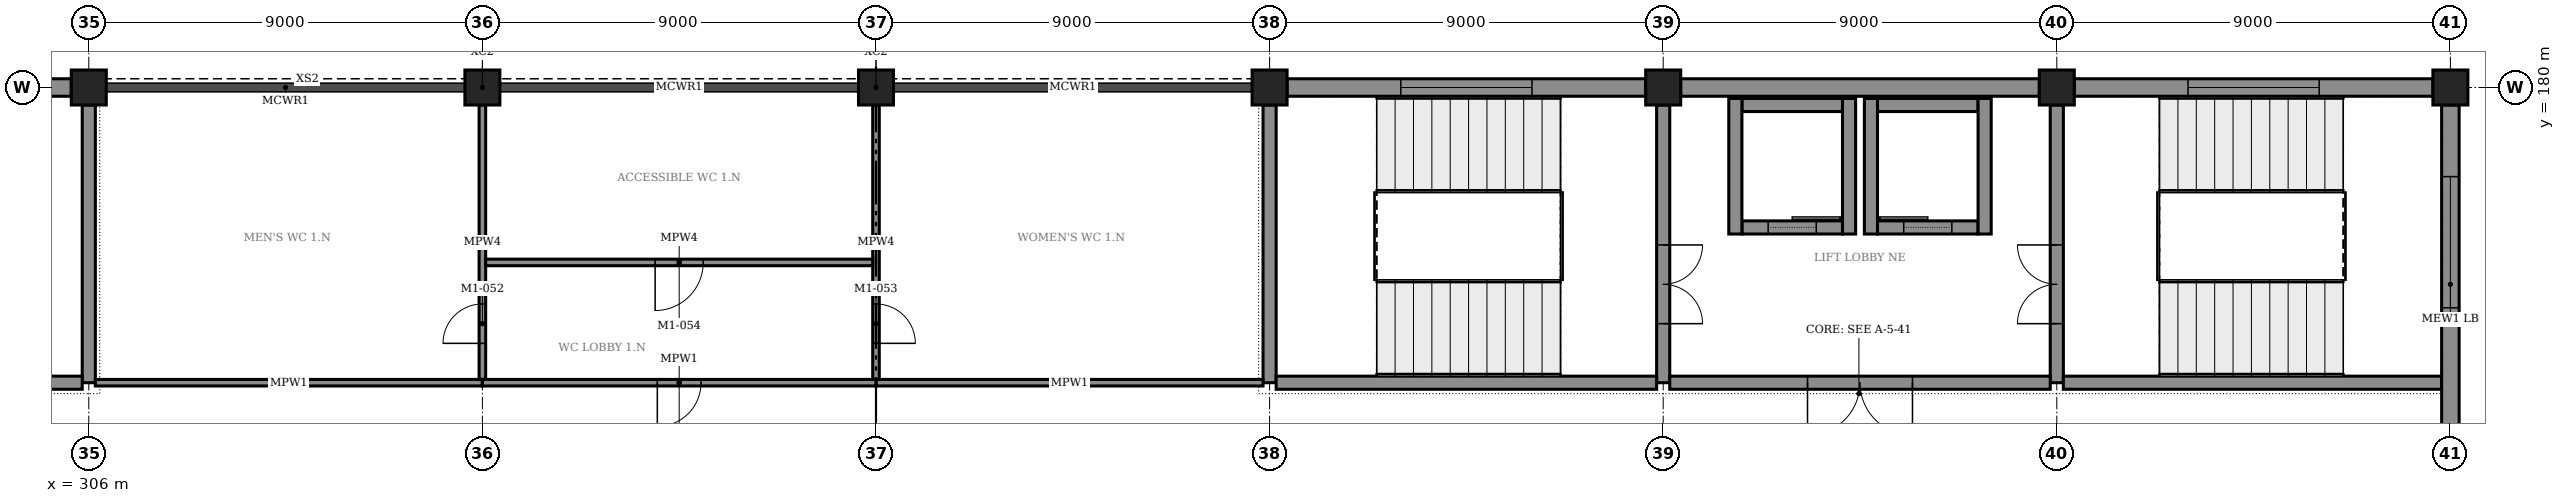
"""IFC4 building model, lengths in metres.
Left out: names, types, materials, properties, quantities, classifications, styles, units other than length and angle.
Written with IfcOpenShell. Run it as: python <this file> out.ifc"""

import sys

from ifc_helpers import new_model, si_unit, direction, frame, frame_2d, origin, origin_2d, place, context, subcontext, project, spatial, rectangle, extrude, element, fill, save


model = new_model("IFC4")
c1 = context("Model", 3, precision=1e-05, world=origin(), true_north=direction((0.0, 1.0)))
c2 = subcontext(c1, "Body", "Model", "MODEL_VIEW")
j1 = project(units=[si_unit("LENGTHUNIT", "METRE"), si_unit("PLANEANGLEUNIT", "RADIAN")], contexts=[c1])
p1 = place(None, origin())
s1 = spatial("IfcSite", under=j1, at=p1, CompositionType="ELEMENT")
p2 = place(p1, origin())
s2 = spatial("IfcBuilding", under=s1, at=p2, CompositionType="ELEMENT")
p3 = place(p2, frame((0.0, 0.0, 6.0)))
s3 = spatial("IfcBuildingStorey", under=s2, at=p3, CompositionType="ELEMENT", Elevation=6.0)
for number, where, z_axis, x_axis in (
    (1, (306.0, 180.0, 0.0), (0.0, 0.0, 1.0), (1.0, 0.0, 0.0)),
    (2, (315.0, 180.0, 0.0), (0.0, 0.0, 1.0), (1.0, 0.0, 0.0)),
    (3, (324.0, 180.0, 0.0), (0.0, 0.0, 1.0), (1.0, 0.0, 0.0)),
    (4, (333.0, 180.0, 0.0), (0.0, 0.0, 1.0), (1.0, 0.0, 0.0)),
    (5, (342.0, 180.0, 0.0), (0.0, 0.0, 1.0), (1.0, 0.0, 0.0)),
    (6, (351.0, 180.0, 0.0), (0.0, 0.0, 1.0), (1.0, 0.0, 0.0)),
    (7, (360.0, 180.0, 0.0), (0.0, 0.0, 1.0), (1.0, 0.0, 0.0)),
):
    element("IfcColumn", number, at=place(p3, frame(where, z_axis=z_axis, x_axis=x_axis)), inside=s3, PredefinedType="COLUMN", context=c2, shape_type="SweptSolid", body=[
        extrude(rectangle(XDim=0.8, YDim=0.8, at=origin_2d()), origin(), (0.0, 0.0, 1.0), 5.5),
    ])
p4 = place(p3, frame((297.4, 180.0, 0.0), z_axis=(0.0, 0.0, 1.0), x_axis=(1.0, 0.0, 0.0)))
e8 = element("IfcWall", 8, at=p4, inside=s3, PredefinedType="STANDARD", context=c2, shape_type="SweptSolid", body=[
    extrude(rectangle(XDim=8.2, YDim=0.4, at=frame_2d((4.1, 0.0))), origin(), (0.0, 0.0, 1.0), 4.32),
])
p5 = place(p4, frame((2.6, 0.0, 0.9)))
e9 = element("IfcOpeningElement", 9, at=p5, cuts=e8, PredefinedType="OPENING", context=c2, shape_type="SweptSolid", body=[
    extrude(rectangle(XDim=3.0, YDim=2.1, at=frame_2d((1.5, 1.05))), frame((0.0, 0.21, 0.0), z_axis=(0.0, -1.0, 0.0), x_axis=(1.0, 0.0, 0.0)), (0.0, 0.0, 1.0), 0.42),
])
p6 = place(p3, frame((333.4, 180.0, 0.0), z_axis=(0.0, 0.0, 1.0), x_axis=(1.0, 0.0, 0.0)))
e10 = element("IfcWall", 10, at=p6, inside=s3, PredefinedType="STANDARD", context=c2, shape_type="SweptSolid", body=[
    extrude(rectangle(XDim=8.2, YDim=0.4, at=frame_2d((4.1, 0.0))), origin(), (0.0, 0.0, 1.0), 4.32),
])
p7 = place(p6, frame((2.6, 0.0, 0.9)))
e11 = element("IfcOpeningElement", 11, at=p7, cuts=e10, PredefinedType="OPENING", context=c2, shape_type="SweptSolid", body=[
    extrude(rectangle(XDim=3.0, YDim=2.1, at=frame_2d((1.5, 1.05))), frame((0.0, 0.21, 0.0), z_axis=(0.0, -1.0, 0.0), x_axis=(1.0, 0.0, 0.0)), (0.0, 0.0, 1.0), 0.42),
])
p8 = place(p3, frame((342.4, 180.0, 0.0), z_axis=(0.0, 0.0, 1.0), x_axis=(1.0, 0.0, 0.0)))
e12 = element("IfcWall", 12, at=p8, inside=s3, PredefinedType="STANDARD", context=c2, shape_type="SweptSolid", body=[
    extrude(rectangle(XDim=8.2, YDim=0.4, at=frame_2d((4.1, 0.0))), origin(), (0.0, 0.0, 1.0), 4.32),
])
p9 = place(p3, frame((351.4, 180.0, 0.0), z_axis=(0.0, 0.0, 1.0), x_axis=(1.0, 0.0, 0.0)))
e13 = element("IfcWall", 13, at=p9, inside=s3, PredefinedType="STANDARD", context=c2, shape_type="SweptSolid", body=[
    extrude(rectangle(XDim=8.2, YDim=0.4, at=frame_2d((4.1, 0.0))), origin(), (0.0, 0.0, 1.0), 4.32),
])
p10 = place(p9, frame((2.6, 0.0, 0.9)))
e14 = element("IfcOpeningElement", 14, at=p10, cuts=e13, PredefinedType="OPENING", context=c2, shape_type="SweptSolid", body=[
    extrude(rectangle(XDim=3.0, YDim=2.1, at=frame_2d((1.5, 1.05))), frame((0.0, 0.21, 0.0), z_axis=(0.0, -1.0, 0.0), x_axis=(1.0, 0.0, 0.0)), (0.0, 0.0, 1.0), 0.42),
])
p11 = place(p3, frame((360.0, 171.4, 0.0), z_axis=(0.0, 0.0, 1.0), x_axis=(0.0, 1.0, 0.0)))
e15 = element("IfcWall", 15, at=p11, inside=s3, PredefinedType="STANDARD", context=c2, shape_type="SweptSolid", body=[
    extrude(rectangle(XDim=8.2, YDim=0.4, at=frame_2d((4.1, 0.0))), origin(), (0.0, 0.0, 1.0), 4.32),
])
p12 = place(p11, frame((3.562, 0.0, 0.9)))
e16 = element("IfcOpeningElement", 16, at=p12, cuts=e15, PredefinedType="OPENING", context=c2, shape_type="SweptSolid", body=[
    extrude(rectangle(XDim=3.0, YDim=2.1, at=frame_2d((1.5, 1.05))), frame((0.0, 0.21, 0.0), z_axis=(0.0, -1.0, 0.0), x_axis=(1.0, 0.0, 0.0)), (0.0, 0.0, 1.0), 0.42),
])
p13 = place(p3, frame((306.0, 173.25, 0.0), z_axis=(0.0, 0.0, 1.0), x_axis=(0.0, 1.0, 0.0)))
e17 = element("IfcWall", 17, at=p13, inside=s3, PredefinedType="SHEAR", context=c2, shape_type="SweptSolid", body=[
    extrude(rectangle(XDim=6.35, YDim=0.3, at=frame_2d((3.175, 0.0))), origin(), (0.0, 0.0, 1.0), 5.22),
])
p14 = place(p3, frame((297.15, 173.25, 0.0), z_axis=(0.0, 0.0, 1.0), x_axis=(1.0, 0.0, 0.0)))
e18 = element("IfcWall", 18, at=p14, inside=s3, PredefinedType="SHEAR", context=c2, shape_type="SweptSolid", body=[
    extrude(rectangle(XDim=8.7, YDim=0.3, at=frame_2d((4.35, 0.0))), origin(), (0.0, 0.0, 1.0), 5.22),
])
p15 = place(p3, frame((351.0, 173.25, 0.0), z_axis=(0.0, 0.0, 1.0), x_axis=(0.0, 1.0, 0.0)))
e19 = element("IfcWall", 19, at=p15, inside=s3, PredefinedType="SHEAR", context=c2, shape_type="SweptSolid", body=[
    extrude(rectangle(XDim=6.35, YDim=0.3, at=frame_2d((3.175, 0.0))), origin(), (0.0, 0.0, 1.0), 5.22),
])
p16 = place(p15, frame((1.35, 0.0, 0.0)))
e20 = element("IfcOpeningElement", 20, at=p16, cuts=e19, PredefinedType="OPENING", context=c2, shape_type="SweptSolid", body=[
    extrude(rectangle(XDim=1.8, YDim=2.4, at=frame_2d((0.9, 1.2))), frame((0.0, 0.16, 0.0), z_axis=(0.0, -1.0, 0.0), x_axis=(1.0, 0.0, 0.0)), (0.0, 0.0, 1.0), 0.32),
])
p17 = place(p3, frame((342.0, 173.25, 0.0), z_axis=(0.0, 0.0, 1.0), x_axis=(0.0, 1.0, 0.0)))
e21 = element("IfcWall", 21, at=p17, inside=s3, PredefinedType="SHEAR", context=c2, shape_type="SweptSolid", body=[
    extrude(rectangle(XDim=6.35, YDim=0.3, at=frame_2d((3.175, 0.0))), origin(), (0.0, 0.0, 1.0), 5.22),
])
p18 = place(p17, frame((1.35, 0.0, 0.0)))
e22 = element("IfcOpeningElement", 22, at=p18, cuts=e21, PredefinedType="OPENING", context=c2, shape_type="SweptSolid", body=[
    extrude(rectangle(XDim=1.8, YDim=2.4, at=frame_2d((0.9, 1.2))), frame((0.0, 0.16, 0.0), z_axis=(0.0, -1.0, 0.0), x_axis=(1.0, 0.0, 0.0)), (0.0, 0.0, 1.0), 0.32),
])
p19 = place(p3, frame((333.0, 173.25, 0.0), z_axis=(0.0, 0.0, 1.0), x_axis=(0.0, 1.0, 0.0)))
e23 = element("IfcWall", 23, at=p19, inside=s3, PredefinedType="SHEAR", context=c2, shape_type="SweptSolid", body=[
    extrude(rectangle(XDim=6.35, YDim=0.3, at=frame_2d((3.175, 0.0))), origin(), (0.0, 0.0, 1.0), 5.22),
])
p20 = place(p3, frame((333.15, 173.25, 0.0), z_axis=(0.0, 0.0, 1.0), x_axis=(1.0, 0.0, 0.0)))
e24 = element("IfcWall", 24, at=p20, inside=s3, PredefinedType="SHEAR", context=c2, shape_type="SweptSolid", body=[
    extrude(rectangle(XDim=8.7, YDim=0.3, at=frame_2d((4.35, 0.0))), origin(), (0.0, 0.0, 1.0), 5.22),
])
p21 = place(p3, frame((342.15, 173.25, 0.0), z_axis=(0.0, 0.0, 1.0), x_axis=(1.0, 0.0, 0.0)))
e25 = element("IfcWall", 25, at=p21, inside=s3, PredefinedType="SHEAR", context=c2, shape_type="SweptSolid", body=[
    extrude(rectangle(XDim=8.7, YDim=0.3, at=frame_2d((4.35, 0.0))), origin(), (0.0, 0.0, 1.0), 5.22),
])
p22 = place(p21, frame((3.15, 0.0, 0.0)))
e26 = element("IfcOpeningElement", 26, at=p22, cuts=e25, PredefinedType="OPENING", context=c2, shape_type="SweptSolid", body=[
    extrude(rectangle(XDim=2.4, YDim=2.4, at=frame_2d((1.2, 1.2))), frame((0.0, 0.16, 0.0), z_axis=(0.0, -1.0, 0.0), x_axis=(1.0, 0.0, 0.0)), (0.0, 0.0, 1.0), 0.32),
])
p23 = place(p3, frame((351.15, 173.25, 0.0), z_axis=(0.0, 0.0, 1.0), x_axis=(1.0, 0.0, 0.0)))
e27 = element("IfcWall", 27, at=p23, inside=s3, PredefinedType="SHEAR", context=c2, shape_type="SweptSolid", body=[
    extrude(rectangle(XDim=8.65, YDim=0.3, at=frame_2d((4.325, 0.0))), origin(), (0.0, 0.0, 1.0), 5.22),
])
for number, where, z_axis, x_axis in (
    (28, (349.35, 176.65, 0.0), (0.0, 0.0, 1.0), (0.0, 1.0, 0.0)),
    (29, (346.75, 176.65, 0.0), (0.0, 0.0, 1.0), (0.0, 1.0, 0.0)),
):
    element("IfcWall", number, at=place(p3, frame(where, z_axis=z_axis, x_axis=x_axis)), inside=s3, PredefinedType="SHEAR", context=c2, shape_type="SweptSolid", body=[
        extrude(rectangle(XDim=3.1, YDim=0.3, at=frame_2d((1.55, 0.0))), origin(), (0.0, 0.0, 1.0), 5.5),
    ])
p24 = place(p3, frame((346.9, 179.6, 0.0), z_axis=(0.0, 0.0, 1.0), x_axis=(1.0, 0.0, 0.0)))
e30 = element("IfcWall", 30, at=p24, inside=s3, PredefinedType="SHEAR", context=c2, shape_type="SweptSolid", body=[
    extrude(rectangle(XDim=2.3, YDim=0.3, at=frame_2d((1.15, 0.0))), origin(), (0.0, 0.0, 1.0), 5.5),
])
p25 = place(p3, frame((346.9, 176.8, 0.0), z_axis=(0.0, 0.0, 1.0), x_axis=(1.0, 0.0, 0.0)))
e31 = element("IfcWall", 31, at=p25, inside=s3, PredefinedType="SHEAR", context=c2, shape_type="SweptSolid", body=[
    extrude(rectangle(XDim=2.3, YDim=0.3, at=frame_2d((1.15, 0.0))), origin(), (0.0, 0.0, 1.0), 5.5),
])
p26 = place(p25, frame((0.6, 0.0, 0.0)))
e32 = element("IfcOpeningElement", 32, at=p26, cuts=e31, PredefinedType="OPENING", context=c2, shape_type="SweptSolid", body=[
    extrude(rectangle(XDim=1.1, YDim=2.2, at=frame_2d((0.55, 1.1))), frame((0.0, 0.16, 0.0), z_axis=(0.0, -1.0, 0.0), x_axis=(1.0, 0.0, 0.0)), (0.0, 0.0, 1.0), 0.32),
])
for number, where, z_axis, x_axis in (
    (33, (346.25, 176.65, 0.0), (0.0, 0.0, 1.0), (0.0, 1.0, 0.0)),
    (34, (343.65, 176.65, 0.0), (0.0, 0.0, 1.0), (0.0, 1.0, 0.0)),
):
    element("IfcWall", number, at=place(p3, frame(where, z_axis=z_axis, x_axis=x_axis)), inside=s3, PredefinedType="SHEAR", context=c2, shape_type="SweptSolid", body=[
        extrude(rectangle(XDim=3.1, YDim=0.3, at=frame_2d((1.55, 0.0))), origin(), (0.0, 0.0, 1.0), 5.5),
    ])
p27 = place(p3, frame((343.8, 179.6, 0.0), z_axis=(0.0, 0.0, 1.0), x_axis=(1.0, 0.0, 0.0)))
e35 = element("IfcWall", 35, at=p27, inside=s3, PredefinedType="SHEAR", context=c2, shape_type="SweptSolid", body=[
    extrude(rectangle(XDim=2.3, YDim=0.3, at=frame_2d((1.15, 0.0))), origin(), (0.0, 0.0, 1.0), 5.5),
])
p28 = place(p3, frame((343.8, 176.8, 0.0), z_axis=(0.0, 0.0, 1.0), x_axis=(1.0, 0.0, 0.0)))
e36 = element("IfcWall", 36, at=p28, inside=s3, PredefinedType="SHEAR", context=c2, shape_type="SweptSolid", body=[
    extrude(rectangle(XDim=2.3, YDim=0.3, at=frame_2d((1.15, 0.0))), origin(), (0.0, 0.0, 1.0), 5.5),
])
p29 = place(p28, frame((0.6, 0.0, 0.0)))
e37 = element("IfcOpeningElement", 37, at=p29, cuts=e36, PredefinedType="OPENING", context=c2, shape_type="SweptSolid", body=[
    extrude(rectangle(XDim=1.1, YDim=2.2, at=frame_2d((0.55, 1.1))), frame((0.0, 0.16, 0.0), z_axis=(0.0, -1.0, 0.0), x_axis=(1.0, 0.0, 0.0)), (0.0, 0.0, 1.0), 0.32),
])
p30 = place(p3, frame((306.15, 173.25, 0.0), z_axis=(0.0, 0.0, 1.0), x_axis=(1.0, 0.0, 0.0)))
e38 = element("IfcWall", 38, at=p30, inside=s3, PredefinedType="PARTITIONING", context=c2, shape_type="SweptSolid", body=[
    extrude(rectangle(XDim=8.85, YDim=0.15, at=frame_2d((4.425, 0.0))), origin(), (0.0, 0.0, 1.0), 4.32),
])
p31 = place(p3, frame((315.0, 173.325, 0.0), z_axis=(0.0, 0.0, 1.0), x_axis=(0.0, 1.0, 0.0)))
e39 = element("IfcWall", 39, at=p31, inside=s3, PredefinedType="PARTITIONING", context=c2, shape_type="SweptSolid", body=[
    extrude(rectangle(XDim=6.275, YDim=0.15, at=frame_2d((3.138, 0.0))), origin(), (0.0, 0.0, 1.0), 4.32),
])
p32 = place(p31, frame((0.825, 0.0, 0.0)))
e40 = element("IfcOpeningElement", 40, at=p32, cuts=e39, PredefinedType="OPENING", context=c2, shape_type="SweptSolid", body=[
    extrude(rectangle(XDim=0.9, YDim=2.1, at=frame_2d((0.45, 1.05))), frame((0.0, 0.085, 0.0), z_axis=(0.0, -1.0, 0.0), x_axis=(1.0, 0.0, 0.0)), (0.0, 0.0, 1.0), 0.17),
])
p33 = place(p3, frame((324.0, 173.25, 0.0), z_axis=(0.0, 0.0, 1.0), x_axis=(1.0, 0.0, 0.0)))
e41 = element("IfcWall", 41, at=p33, inside=s3, PredefinedType="PARTITIONING", context=c2, shape_type="SweptSolid", body=[
    extrude(rectangle(XDim=8.85, YDim=0.15, at=frame_2d((4.425, 0.0))), origin(), (0.0, 0.0, 1.0), 4.32),
])
p34 = place(p3, frame((324.0, 173.325, 0.0), z_axis=(0.0, 0.0, 1.0), x_axis=(0.0, 1.0, 0.0)))
e42 = element("IfcWall", 42, at=p34, inside=s3, PredefinedType="PARTITIONING", context=c2, shape_type="SweptSolid", body=[
    extrude(rectangle(XDim=6.275, YDim=0.15, at=frame_2d((3.138, 0.0))), origin(), (0.0, 0.0, 1.0), 4.32),
])
p35 = place(p34, frame((0.825, 0.0, 0.0)))
e43 = element("IfcOpeningElement", 43, at=p35, cuts=e42, PredefinedType="OPENING", context=c2, shape_type="SweptSolid", body=[
    extrude(rectangle(XDim=0.9, YDim=2.1, at=frame_2d((0.45, 1.05))), frame((0.0, 0.085, 0.0), z_axis=(0.0, -1.0, 0.0), x_axis=(1.0, 0.0, 0.0)), (0.0, 0.0, 1.0), 0.17),
])
p36 = place(p3, frame((315.075, 176.0, 0.0), z_axis=(0.0, 0.0, 1.0), x_axis=(1.0, 0.0, 0.0)))
e44 = element("IfcWall", 44, at=p36, inside=s3, PredefinedType="PARTITIONING", context=c2, shape_type="SweptSolid", body=[
    extrude(rectangle(XDim=8.85, YDim=0.15, at=frame_2d((4.425, 0.0))), origin(), (0.0, 0.0, 1.0), 4.32),
])
p37 = place(p36, frame((3.875, 0.0, 0.0)))
e45 = element("IfcOpeningElement", 45, at=p37, cuts=e44, PredefinedType="OPENING", context=c2, shape_type="SweptSolid", body=[
    extrude(rectangle(XDim=1.1, YDim=2.1, at=frame_2d((0.55, 1.05))), frame((0.0, 0.085, 0.0), z_axis=(0.0, -1.0, 0.0), x_axis=(1.0, 0.0, 0.0)), (0.0, 0.0, 1.0), 0.17),
])
p38 = place(p3, frame((315.0, 173.25, 0.0), z_axis=(0.0, 0.0, 1.0), x_axis=(1.0, 0.0, 0.0)))
e46 = element("IfcWall", 46, at=p38, inside=s3, PredefinedType="PARTITIONING", context=c2, shape_type="SweptSolid", body=[
    extrude(rectangle(XDim=9.0, YDim=0.15, at=frame_2d((4.5, 0.0))), origin(), (0.0, 0.0, 1.0), 4.32),
])
p39 = place(p38, frame((4.0, 0.0, 0.0)))
e47 = element("IfcOpeningElement", 47, at=p39, cuts=e46, PredefinedType="OPENING", context=c2, shape_type="SweptSolid", body=[
    extrude(rectangle(XDim=1.0, YDim=2.4, at=frame_2d((0.5, 1.2))), frame((0.0, 0.085, 0.0), z_axis=(0.0, -1.0, 0.0), x_axis=(1.0, 0.0, 0.0)), (0.0, 0.0, 1.0), 0.17),
])
p40 = place(p7, origin())
e48 = element("IfcWindow", 48, at=p40, inside=s3, PartitioningType="TRIPLE_PANEL_VERTICAL", PredefinedType="WINDOW", context=c2, shape_type="SweptSolid", body=[
    extrude(rectangle(XDim=3.0, YDim=2.1, at=frame_2d((1.5, 1.05))), frame((0.0, 0.03, 0.0), z_axis=(0.0, -1.0, 0.0), x_axis=(1.0, 0.0, 0.0)), (0.0, 0.0, 1.0), 0.06),
])
fill(e11, e48)
p41 = place(p10, origin())
e49 = element("IfcWindow", 49, at=p41, inside=s3, PartitioningType="TRIPLE_PANEL_VERTICAL", PredefinedType="WINDOW", context=c2, shape_type="SweptSolid", body=[
    extrude(rectangle(XDim=3.0, YDim=2.1, at=frame_2d((1.5, 1.05))), frame((0.0, 0.03, 0.0), z_axis=(0.0, -1.0, 0.0), x_axis=(1.0, 0.0, 0.0)), (0.0, 0.0, 1.0), 0.06),
])
fill(e14, e49)
p42 = place(p12, origin())
e50 = element("IfcWindow", 50, at=p42, inside=s3, PartitioningType="TRIPLE_PANEL_VERTICAL", PredefinedType="WINDOW", context=c2, shape_type="SweptSolid", body=[
    extrude(rectangle(XDim=3.0, YDim=2.1, at=frame_2d((1.5, 1.05))), frame((0.0, 0.03, 0.0), z_axis=(0.0, -1.0, 0.0), x_axis=(1.0, 0.0, 0.0)), (0.0, 0.0, 1.0), 0.06),
])
fill(e16, e50)
p43 = place(p16, origin())
e51 = element("IfcDoor", 51, at=p43, inside=s3, OperationType="DOUBLE_DOOR_SINGLE_SWING", PredefinedType="DOOR", context=c2, shape_type="SweptSolid", body=[
    extrude(rectangle(XDim=1.8, YDim=2.4, at=frame_2d((0.9, 1.2))), frame((0.0, 0.025, 0.0), z_axis=(0.0, -1.0, 0.0), x_axis=(1.0, 0.0, 0.0)), (0.0, 0.0, 1.0), 0.05),
])
fill(e20, e51)
p44 = place(p18, frame((1.8, 0.0, 0.0), z_axis=(0.0, 0.0, 1.0), x_axis=(-1.0, 0.0, 0.0)))
e52 = element("IfcDoor", 52, at=p44, inside=s3, OperationType="DOUBLE_DOOR_SINGLE_SWING", PredefinedType="DOOR", context=c2, shape_type="SweptSolid", body=[
    extrude(rectangle(XDim=1.8, YDim=2.4, at=frame_2d((0.9, 1.2))), frame((0.0, 0.025, 0.0), z_axis=(0.0, -1.0, 0.0), x_axis=(1.0, 0.0, 0.0)), (0.0, 0.0, 1.0), 0.05),
])
fill(e22, e52)
p45 = place(p22, frame((2.4, 0.0, 0.0), z_axis=(0.0, 0.0, 1.0), x_axis=(-1.0, 0.0, 0.0)))
e53 = element("IfcDoor", 53, at=p45, inside=s3, OperationType="DOUBLE_DOOR_SINGLE_SWING", PredefinedType="DOOR", context=c2, shape_type="SweptSolid", body=[
    extrude(rectangle(XDim=2.4, YDim=2.4, at=frame_2d((1.2, 1.2))), frame((0.0, 0.025, 0.0), z_axis=(0.0, -1.0, 0.0), x_axis=(1.0, 0.0, 0.0)), (0.0, 0.0, 1.0), 0.05),
])
fill(e26, e53)
p46 = place(p26, origin())
e54 = element("IfcDoor", 54, at=p46, inside=s3, OperationType="SLIDING_TO_LEFT", PredefinedType="DOOR", context=c2, shape_type="SweptSolid", body=[
    extrude(rectangle(XDim=1.1, YDim=2.2, at=frame_2d((0.55, 1.1))), frame((0.0, 0.025, 0.0), z_axis=(0.0, -1.0, 0.0), x_axis=(1.0, 0.0, 0.0)), (0.0, 0.0, 1.0), 0.05),
])
fill(e32, e54)
p47 = place(p29, origin())
e55 = element("IfcDoor", 55, at=p47, inside=s3, OperationType="SLIDING_TO_RIGHT", PredefinedType="DOOR", context=c2, shape_type="SweptSolid", body=[
    extrude(rectangle(XDim=1.1, YDim=2.2, at=frame_2d((0.55, 1.1))), frame((0.0, 0.025, 0.0), z_axis=(0.0, -1.0, 0.0), x_axis=(1.0, 0.0, 0.0)), (0.0, 0.0, 1.0), 0.05),
])
fill(e37, e55)
p48 = place(p32, origin())
e56 = element("IfcDoor", 56, at=p48, inside=s3, OperationType="SINGLE_SWING_LEFT", PredefinedType="DOOR", context=c2, shape_type="SweptSolid", body=[
    extrude(rectangle(XDim=0.9, YDim=2.1, at=frame_2d((0.45, 1.05))), frame((0.0, 0.025, 0.0), z_axis=(0.0, -1.0, 0.0), x_axis=(1.0, 0.0, 0.0)), (0.0, 0.0, 1.0), 0.05),
])
fill(e40, e56)
p49 = place(p35, frame((0.9, 0.0, 0.0), z_axis=(0.0, 0.0, 1.0), x_axis=(-1.0, 0.0, 0.0)))
e57 = element("IfcDoor", 57, at=p49, inside=s3, OperationType="SINGLE_SWING_LEFT", PredefinedType="DOOR", context=c2, shape_type="SweptSolid", body=[
    extrude(rectangle(XDim=0.9, YDim=2.1, at=frame_2d((0.45, 1.05))), frame((0.0, 0.025, 0.0), z_axis=(0.0, -1.0, 0.0), x_axis=(1.0, 0.0, 0.0)), (0.0, 0.0, 1.0), 0.05),
])
fill(e43, e57)
p50 = place(p37, frame((1.1, 0.0, 0.0), z_axis=(0.0, 0.0, 1.0), x_axis=(-1.0, 0.0, 0.0)))
e58 = element("IfcDoor", 58, at=p50, inside=s3, OperationType="SINGLE_SWING_LEFT", PredefinedType="DOOR", context=c2, shape_type="SweptSolid", body=[
    extrude(rectangle(XDim=1.1, YDim=2.1, at=frame_2d((0.55, 1.05))), frame((0.0, 0.025, 0.0), z_axis=(0.0, -1.0, 0.0), x_axis=(1.0, 0.0, 0.0)), (0.0, 0.0, 1.0), 0.05),
])
fill(e45, e58)
p51 = place(p39, frame((1.0, 0.0, 0.0), z_axis=(0.0, 0.0, 1.0), x_axis=(-1.0, 0.0, 0.0)))
e59 = element("IfcDoor", 59, at=p51, inside=s3, OperationType="SINGLE_SWING_LEFT", PredefinedType="DOOR", context=c2, shape_type="SweptSolid", body=[
    extrude(rectangle(XDim=1.0, YDim=2.4, at=frame_2d((0.5, 1.2))), frame((0.0, 0.025, 0.0), z_axis=(0.0, -1.0, 0.0), x_axis=(1.0, 0.0, 0.0)), (0.0, 0.0, 1.0), 0.05),
])
fill(e47, e59)
save(model, sys.argv[1])
